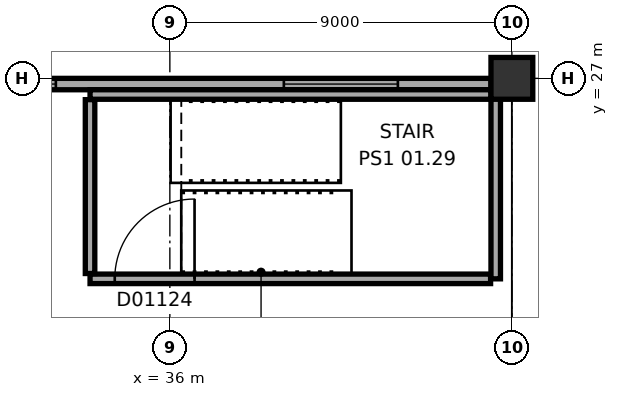
"""IFC4 building model, lengths in metres.
Left out: names, types, materials, properties, quantities, classifications, styles, units other than length and angle.
Written with IfcOpenShell. Run it as: python <this file> out.ifc"""

import sys

from ifc_helpers import new_model, si_unit, direction, frame, frame_2d, origin, origin_2d, place, context, subcontext, project, spatial, rectangle, extrude, element, fill, save


model = new_model("IFC4")
c1 = context("Model", 3, precision=1e-05, world=origin(), true_north=direction((0.0, 1.0)))
c2 = subcontext(c1, "Body", "Model", "MODEL_VIEW")
j1 = project(units=[si_unit("LENGTHUNIT", "METRE"), si_unit("PLANEANGLEUNIT", "RADIAN")], contexts=[c1])
p1 = place(None, origin())
s1 = spatial("IfcSite", under=j1, at=p1, CompositionType="ELEMENT")
p2 = place(p1, origin())
s2 = spatial("IfcBuilding", under=s1, at=p2, CompositionType="ELEMENT")
p3 = place(p2, frame((0.0, 0.0, 7.5)))
s3 = spatial("IfcBuildingStorey", under=s2, at=p3, CompositionType="ELEMENT", Elevation=7.5)
p4 = place(p3, frame((45.0, 27.0, 0.0), z_axis=(0.0, 0.0, 1.0), x_axis=(1.0, 0.0, 0.0)))
e1 = element("IfcColumn", 1, at=p4, inside=s3, PredefinedType="COLUMN", context=c2, shape_type="SweptSolid", body=[
    extrude(rectangle(XDim=1.1, YDim=1.1, at=origin_2d()), origin(), (0.0, 0.0, 1.0), 5.5),
])
p5 = place(p3, frame((44.45, 26.85, 0.0), z_axis=(0.0, 0.0, 1.0), x_axis=(-1.0, 0.0, 0.0)))
e2 = element("IfcWall", 2, at=p5, inside=s3, PredefinedType="STANDARD", context=c2, shape_type="SweptSolid", body=[
    extrude(rectangle(XDim=16.9, YDim=0.3, at=frame_2d((8.45, 0.0))), origin(), (0.0, 0.0, 1.0), 4.0),
])
p6 = place(p5, frame((2.45, 0.0, 1.0)))
e3 = element("IfcOpeningElement", 3, at=p6, cuts=e2, PredefinedType="OPENING", context=c2, shape_type="SweptSolid", body=[
    extrude(rectangle(XDim=3.0, YDim=2.6, at=frame_2d((1.5, 1.3))), frame((0.0, 0.16, 0.0), z_axis=(0.0, -1.0, 0.0), x_axis=(1.0, 0.0, 0.0)), (0.0, 0.0, 1.0), 0.32),
])
p7 = place(p5, frame((11.45, 0.0, 1.0)))
e4 = element("IfcOpeningElement", 4, at=p7, cuts=e2, PredefinedType="OPENING", context=c2, shape_type="SweptSolid", body=[
    extrude(rectangle(XDim=3.0, YDim=2.6, at=frame_2d((1.5, 1.3))), frame((0.0, 0.16, 0.0), z_axis=(0.0, -1.0, 0.0), x_axis=(1.0, 0.0, 0.0)), (0.0, 0.0, 1.0), 0.32),
])
p8 = place(p3, frame((44.44, 21.725, 0.0), z_axis=(0.0, 0.0, 1.0), x_axis=(-1.0, 0.0, 0.0)))
e5 = element("IfcWall", 5, at=p8, inside=s3, PredefinedType="SOLIDWALL", context=c2, shape_type="SweptSolid", body=[
    extrude(rectangle(XDim=10.54, YDim=0.25, at=frame_2d((5.27, 0.0))), origin(), (0.0, 0.0, 1.0), 5.2),
])
p9 = place(p8, frame((7.79, 0.0, 0.0)))
e6 = element("IfcOpeningElement", 6, at=p9, cuts=e5, PredefinedType="OPENING", context=c2, shape_type="SweptSolid", body=[
    extrude(rectangle(XDim=2.1, YDim=2.4, at=frame_2d((1.05, 1.2))), frame((0.0, 0.135, 0.0), z_axis=(0.0, -1.0, 0.0), x_axis=(1.0, 0.0, 0.0)), (0.0, 0.0, 1.0), 0.27),
])
p10 = place(p3, frame((33.9, 21.865, 0.0), z_axis=(0.0, 0.0, 1.0), x_axis=(0.0, 1.0, 0.0)))
e7 = element("IfcWall", 7, at=p10, inside=s3, PredefinedType="SOLIDWALL", context=c2, shape_type="SweptSolid", body=[
    extrude(rectangle(XDim=4.575, YDim=0.25, at=frame_2d((2.288, 0.0))), origin(), (0.0, 0.0, 1.0), 5.2),
])
p11 = place(p3, frame((44.575, 21.725, 0.0), z_axis=(0.0, 0.0, 1.0), x_axis=(0.0, 1.0, 0.0)))
e8 = element("IfcWall", 8, at=p11, inside=s3, PredefinedType="SOLIDWALL", context=c2, shape_type="SweptSolid", body=[
    extrude(rectangle(XDim=4.975, YDim=0.25, at=frame_2d((2.487, 0.0))), origin(), (0.0, 0.0, 1.0), 5.2),
])
p12 = place(p3, frame((44.45, 26.575, 0.0), z_axis=(0.0, 0.0, 1.0), x_axis=(-1.0, 0.0, 0.0)))
e9 = element("IfcWall", 9, at=p12, inside=s3, PredefinedType="SOLIDWALL", context=c2, shape_type="SweptSolid", body=[
    extrude(rectangle(XDim=10.55, YDim=0.25, at=frame_2d((5.275, 0.0))), origin(), (0.0, 0.0, 1.0), 5.2),
])
p13 = place(p6, origin())
e10 = element("IfcWindow", 10, at=p13, inside=s3, PartitioningType="SINGLE_PANEL", PredefinedType="WINDOW", context=c2, shape_type="SweptSolid", body=[
    extrude(rectangle(XDim=3.0, YDim=2.6, at=frame_2d((1.5, 1.3))), frame((0.0, 0.03, 0.0), z_axis=(0.0, -1.0, 0.0), x_axis=(1.0, 0.0, 0.0)), (0.0, 0.0, 1.0), 0.06),
])
fill(e3, e10)
p14 = place(p7, origin())
e11 = element("IfcWindow", 11, at=p14, inside=s3, PartitioningType="SINGLE_PANEL", PredefinedType="WINDOW", context=c2, shape_type="SweptSolid", body=[
    extrude(rectangle(XDim=3.0, YDim=2.6, at=frame_2d((1.5, 1.3))), frame((0.0, 0.03, 0.0), z_axis=(0.0, -1.0, 0.0), x_axis=(1.0, 0.0, 0.0)), (0.0, 0.0, 1.0), 0.06),
])
fill(e4, e11)
p15 = place(p9, frame((2.1, 0.0, 0.0), z_axis=(0.0, 0.0, 1.0), x_axis=(-1.0, 0.0, 0.0)))
e12 = element("IfcDoor", 12, at=p15, inside=s3, OperationType="DOUBLE_DOOR_SINGLE_SWING", PredefinedType="DOOR", context=c2, shape_type="SweptSolid", body=[
    extrude(rectangle(XDim=2.1, YDim=2.4, at=frame_2d((1.05, 1.2))), frame((0.0, 0.025, 0.0), z_axis=(0.0, -1.0, 0.0), x_axis=(1.0, 0.0, 0.0)), (0.0, 0.0, 1.0), 0.05),
])
fill(e6, e12)
save(model, sys.argv[1])
